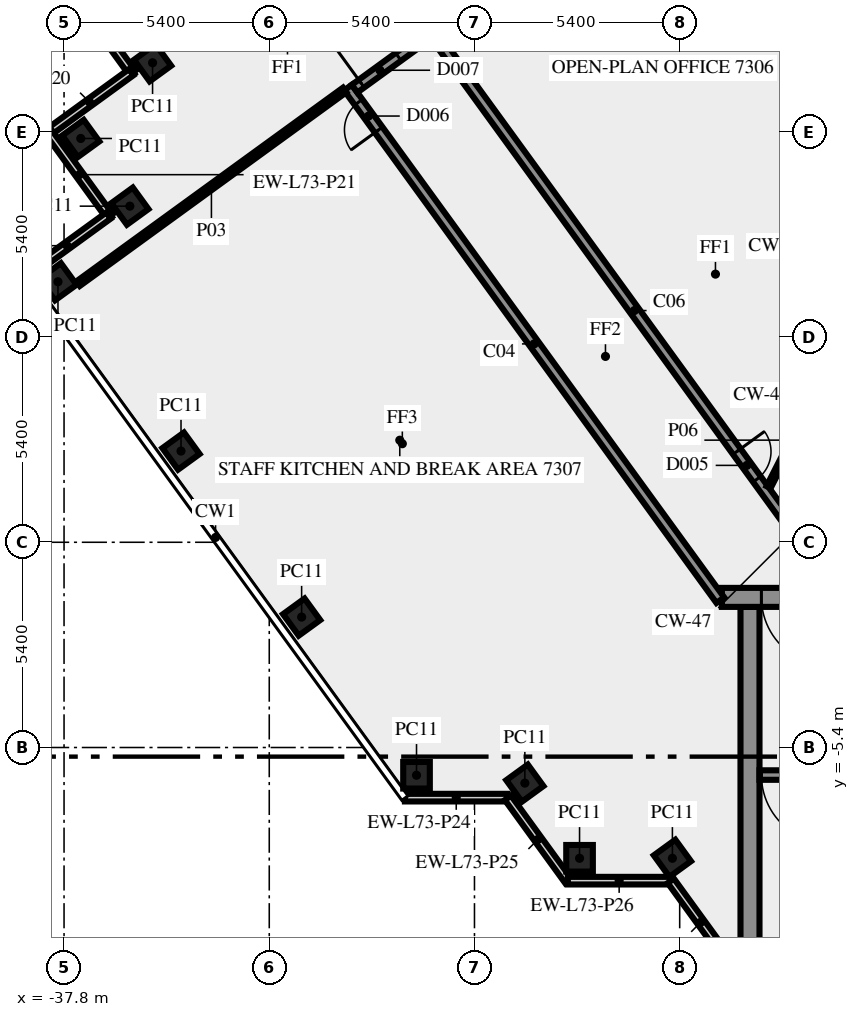
"""IFC4 building model, lengths in metres.
Left out: names, types, materials, properties, quantities, classifications, styles, units other than length and angle.
Written with IfcOpenShell. Run it as: python <this file> out.ifc"""

import sys

from ifc_helpers import new_model, si_unit, direction, frame, frame_2d, origin, origin_2d, place, context, subcontext, project, spatial, rectangle, extrude, element, fill, save


model = new_model("IFC4")
c1 = context("Model", 3, precision=1e-05, world=origin(), true_north=direction((0.0, 1.0)))
c2 = subcontext(c1, "Body", "Model", "MODEL_VIEW")
j1 = project(units=[si_unit("LENGTHUNIT", "METRE"), si_unit("PLANEANGLEUNIT", "RADIAN")], contexts=[c1])
p1 = place(None, origin())
s1 = spatial("IfcSite", under=j1, at=p1, CompositionType="ELEMENT")
p2 = place(p1, origin())
s2 = spatial("IfcBuilding", under=s1, at=p2, CompositionType="ELEMENT")
p3 = place(p2, frame((0.0, 0.0, 315.0)))
s3 = spatial("IfcBuildingStorey", under=s2, at=p3, CompositionType="ELEMENT", Elevation=315.0)
for number, where, z_axis, x_axis in (
    (1, (-35.471, 12.616, 0.0), (0.0, 0.0, 1.0), (-0.809, -0.588, 0.0)),
    (2, (-37.36, 10.625, 0.0), (0.0, 0.0, 1.0), (0.588, -0.809, 0.0)),
    (3, (-36.068, 8.844, 0.0), (0.0, 0.0, 1.0), (0.588, -0.809, 0.0)),
    (4, (-37.96, 6.855, 0.0), (0.0, 0.0, 1.0), (0.588, -0.809, 0.0)),
    (5, (-34.722, 2.4, 0.0), (0.0, 0.0, 1.0), (0.588, -0.809, 0.0)),
    (6, (-31.548, -1.969, 0.0), (0.0, 0.0, 1.0), (0.588, -0.809, 0.0)),
    (7, (-28.525, -6.13, 0.0), (0.0, 0.0, 1.0), (1.0, 0.0, 0.0)),
    (8, (-25.674, -6.337, 0.0), (0.0, 0.0, 1.0), (0.588, -0.809, 0.0)),
    (9, (-24.235, -8.315, 0.0), (0.0, 0.0, 1.0), (1.0, 0.0, 0.0)),
    (10, (-21.792, -8.315, 0.0), (0.0, 0.0, 1.0), (0.588, -0.809, 0.0)),
):
    element("IfcColumn", number, at=place(p3, frame(where, z_axis=z_axis, x_axis=x_axis)), inside=s3, PredefinedType="COLUMN", context=c2, shape_type="SweptSolid", body=[
        extrude(rectangle(XDim=0.7, YDim=0.7, at=origin_2d()), origin(), (0.0, 0.0, 1.0), 3.65),
    ])
for number, where, z_axis, x_axis in (
    (11, (-37.592, 14.536, 0.0), (0.0, 0.0, 1.0), (0.588, -0.809, 0.0)),
    (12, (-36.032, 12.369, 0.0), (0.0, 0.0, 1.0), (-0.809, -0.588, 0.0)),
    (13, (-38.189, 10.765, 0.0), (0.0, 0.0, 1.0), (0.588, -0.809, 0.0)),
    (14, (-36.629, 8.597, 0.0), (0.0, 0.0, 1.0), (-0.809, -0.588, 0.0)),
    (15, (-28.83, -6.719, 0.0), (0.0, 0.0, 1.0), (1.0, 0.0, 0.0)),
):
    element("IfcWall", number, at=place(p3, frame(where, z_axis=z_axis, x_axis=x_axis)), inside=s3, PredefinedType="SOLIDWALL", context=c2, shape_type="SweptSolid", body=[
        extrude(rectangle(XDim=2.7, YDim=0.2, at=frame_2d((1.35, 0.0))), origin(), (0.0, 0.0, 1.0), 3.65),
    ])
p4 = place(p3, frame((-26.12, -6.724, 0.0), z_axis=(0.0, 0.0, 1.0), x_axis=(0.587720002413, -0.809064397168, 0.0)))
e16 = element("IfcWall", 16, at=p4, inside=s3, PredefinedType="SOLIDWALL", context=c2, shape_type="SweptSolid", body=[
    extrude(rectangle(XDim=2.7, YDim=0.2, at=frame_2d((1.35, 0.0))), origin(), (0.0, 0.0, 1.0), 3.65),
])
p5 = place(p3, frame((-24.543, -8.904, 0.0), z_axis=(0.0, 0.0, 1.0), x_axis=(1.0, 0.0, 0.0)))
e17 = element("IfcWall", 17, at=p5, inside=s3, PredefinedType="SOLIDWALL", context=c2, shape_type="SweptSolid", body=[
    extrude(rectangle(XDim=2.7, YDim=0.2, at=frame_2d((1.35, 0.0))), origin(), (0.0, 0.0, 1.0), 3.65),
])
p6 = place(p3, frame((-21.833, -8.909, 0.0), z_axis=(0.0, 0.0, 1.0), x_axis=(0.587766567315, -0.809030569476, 0.0)))
e18 = element("IfcWall", 18, at=p6, inside=s3, PredefinedType="SOLIDWALL", context=c2, shape_type="SweptSolid", body=[
    extrude(rectangle(XDim=2.688, YDim=0.2, at=frame_2d((1.344, 0.0))), origin(), (0.0, 0.0, 1.0), 3.65),
])
p7 = place(p3, frame((-19.75, -10.5, 0.0), z_axis=(0.0, 0.0, 1.0), x_axis=(0.0, 1.0, 0.0)))
e19 = element("IfcWall", 19, at=p7, inside=s3, PredefinedType="SHEAR", context=c2, shape_type="SweptSolid", body=[
    extrude(rectangle(XDim=8.8, YDim=0.5, at=frame_2d((4.4, 0.0))), origin(), (0.0, 0.0, 1.0), 3.65),
])
p8 = place(p3, frame((-11.45, -6.125, 0.0), z_axis=(0.0, 0.0, 1.0), x_axis=(-1.0, 0.0, 0.0)))
e20 = element("IfcWall", 20, at=p8, inside=s3, PredefinedType="SHEAR", context=c2, shape_type="SweptSolid", body=[
    extrude(rectangle(XDim=8.05, YDim=0.25, at=frame_2d((4.025, 0.0))), origin(), (0.0, 0.0, 1.0), 3.65),
])
p9 = place(p8, frame((6.2, 0.0, 0.0)))
e21 = element("IfcOpeningElement", 21, at=p9, cuts=e20, PredefinedType="OPENING", context=c2, shape_type="SweptSolid", body=[
    extrude(rectangle(XDim=1.8, YDim=2.1, at=frame_2d((0.9, 1.05))), frame((0.0, 0.135, 0.0), z_axis=(0.0, -1.0, 0.0), x_axis=(1.0, 0.0, 0.0)), (0.0, 0.0, 1.0), 0.27),
])
p10 = place(p3, frame((20.49, -1.45, 0.0), z_axis=(0.0, 0.0, 1.0), x_axis=(-1.0, 0.0, 0.0)))
e22 = element("IfcWall", 22, at=p10, inside=s3, PredefinedType="SHEAR", context=c2, shape_type="SweptSolid", body=[
    extrude(rectangle(XDim=40.98, YDim=0.5, at=frame_2d((20.49, 0.0))), origin(), (0.0, 0.0, 1.0), 3.65),
])
p11 = place(p10, frame((38.14, 0.0, 0.0)))
e23 = element("IfcOpeningElement", 23, at=p11, cuts=e22, PredefinedType="OPENING", context=c2, shape_type="SweptSolid", body=[
    extrude(rectangle(XDim=1.8, YDim=2.1, at=frame_2d((0.9, 1.05))), frame((0.0, 0.26, 0.0), z_axis=(0.0, -1.0, 0.0), x_axis=(1.0, 0.0, 0.0)), (0.0, 0.0, 1.0), 0.52),
])
p12 = place(p10, frame((35.89, 0.0, 0.0)))
e24 = element("IfcOpeningElement", 24, at=p12, cuts=e22, PredefinedType="OPENING", context=c2, shape_type="SweptSolid", body=[
    extrude(rectangle(XDim=0.9, YDim=2.1, at=frame_2d((0.45, 1.05))), frame((0.0, 0.26, 0.0), z_axis=(0.0, -1.0, 0.0), x_axis=(1.0, 0.0, 0.0)), (0.0, 0.0, 1.0), 0.52),
])
p13 = place(p10, frame((32.94, 0.0, 0.0)))
e25 = element("IfcOpeningElement", 25, at=p13, cuts=e22, PredefinedType="OPENING", context=c2, shape_type="SweptSolid", body=[
    extrude(rectangle(XDim=0.9, YDim=2.1, at=frame_2d((0.45, 1.05))), frame((0.0, 0.26, 0.0), z_axis=(0.0, -1.0, 0.0), x_axis=(1.0, 0.0, 0.0)), (0.0, 0.0, 1.0), 0.52),
])
p14 = place(p10, frame((31.015, 0.0, 0.0)))
e26 = element("IfcOpeningElement", 26, at=p14, cuts=e22, PredefinedType="OPENING", context=c2, shape_type="SweptSolid", body=[
    extrude(rectangle(XDim=0.8, YDim=2.1, at=frame_2d((0.4, 1.05))), frame((0.0, 0.26, 0.0), z_axis=(0.0, -1.0, 0.0), x_axis=(1.0, 0.0, 0.0)), (0.0, 0.0, 1.0), 0.52),
])
p15 = place(p10, frame((24.765, 0.0, 0.0)))
e27 = element("IfcOpeningElement", 27, at=p15, cuts=e22, PredefinedType="OPENING", context=c2, shape_type="SweptSolid", body=[
    extrude(rectangle(XDim=0.8, YDim=2.1, at=frame_2d((0.4, 1.05))), frame((0.0, 0.26, 0.0), z_axis=(0.0, -1.0, 0.0), x_axis=(1.0, 0.0, 0.0)), (0.0, 0.0, 1.0), 0.52),
])
p16 = place(p10, frame((21.765, 0.0, 0.0)))
e28 = element("IfcOpeningElement", 28, at=p16, cuts=e22, PredefinedType="OPENING", context=c2, shape_type="SweptSolid", body=[
    extrude(rectangle(XDim=2.0, YDim=2.1, at=frame_2d((1.0, 1.05))), frame((0.0, 0.26, 0.0), z_axis=(0.0, -1.0, 0.0), x_axis=(1.0, 0.0, 0.0)), (0.0, 0.0, 1.0), 0.52),
])
p17 = place(p10, frame((12.24, 0.0, 0.0)))
e29 = element("IfcOpeningElement", 29, at=p17, cuts=e22, PredefinedType="OPENING", context=c2, shape_type="SweptSolid", body=[
    extrude(rectangle(XDim=0.9, YDim=2.1, at=frame_2d((0.45, 1.05))), frame((0.0, 0.26, 0.0), z_axis=(0.0, -1.0, 0.0), x_axis=(1.0, 0.0, 0.0)), (0.0, 0.0, 1.0), 0.52),
])
p18 = place(p10, frame((7.14, 0.0, 0.0)))
e30 = element("IfcOpeningElement", 30, at=p18, cuts=e22, PredefinedType="OPENING", context=c2, shape_type="SweptSolid", body=[
    extrude(rectangle(XDim=0.9, YDim=2.1, at=frame_2d((0.45, 1.05))), frame((0.0, 0.26, 0.0), z_axis=(0.0, -1.0, 0.0), x_axis=(1.0, 0.0, 0.0)), (0.0, 0.0, 1.0), 0.52),
])
p19 = place(p10, frame((5.028, 0.0, 0.0)))
e31 = element("IfcOpeningElement", 31, at=p19, cuts=e22, PredefinedType="OPENING", context=c2, shape_type="SweptSolid", body=[
    extrude(rectangle(XDim=0.8, YDim=2.1, at=frame_2d((0.4, 1.05))), frame((0.0, 0.26, 0.0), z_axis=(0.0, -1.0, 0.0), x_axis=(1.0, 0.0, 0.0)), (0.0, 0.0, 1.0), 0.52),
])
p20 = place(p10, frame((3.452, 0.0, 0.0)))
e32 = element("IfcOpeningElement", 32, at=p20, cuts=e22, PredefinedType="OPENING", context=c2, shape_type="SweptSolid", body=[
    extrude(rectangle(XDim=0.8, YDim=2.1, at=frame_2d((0.4, 1.05))), frame((0.0, 0.26, 0.0), z_axis=(0.0, -1.0, 0.0), x_axis=(1.0, 0.0, 0.0)), (0.0, 0.0, 1.0), 0.52),
])
p21 = place(p10, frame((1.04, 0.0, 0.0)))
e33 = element("IfcOpeningElement", 33, at=p21, cuts=e22, PredefinedType="OPENING", context=c2, shape_type="SweptSolid", body=[
    extrude(rectangle(XDim=1.8, YDim=2.1, at=frame_2d((0.9, 1.05))), frame((0.0, 0.26, 0.0), z_axis=(0.0, -1.0, 0.0), x_axis=(1.0, 0.0, 0.0)), (0.0, 0.0, 1.0), 0.52),
])
p22 = place(p3, frame((-20.531, -1.523, 0.0), z_axis=(0.0, 0.0, 1.0), x_axis=(-0.587785867777, 0.809016547199, 0.0)))
e34 = element("IfcWall", 34, at=p22, inside=s3, PredefinedType="SOLIDWALL", context=c2, shape_type="SweptSolid", body=[
    extrude(rectangle(XDim=16.67, YDim=0.25, at=frame_2d((8.335, 0.0))), origin(), (0.0, 0.0, 1.0), 3.65),
])
p23 = place(p22, frame((15.296, 0.0, 0.0)))
e35 = element("IfcOpeningElement", 35, at=p23, cuts=e34, PredefinedType="OPENING", context=c2, shape_type="SweptSolid", body=[
    extrude(rectangle(XDim=0.9, YDim=2.1, at=frame_2d((0.45, 1.05))), frame((0.0, 0.135, 0.0), z_axis=(0.0, -1.0, 0.0), x_axis=(1.0, 0.0, 0.0)), (0.0, 0.0, 1.0), 0.27),
])
p24 = place(p3, frame((-30.155, 11.936, 0.0), z_axis=(0.0, 0.0, 1.0), x_axis=(0.809038743598, 0.587755315891, 0.0)))
e36 = element("IfcWall", 36, at=p24, inside=s3, PredefinedType="SOLIDWALL", context=c2, shape_type="SweptSolid", body=[
    extrude(rectangle(XDim=2.65, YDim=0.25, at=frame_2d((1.325, 0.0))), origin(), (0.0, 0.0, 1.0), 3.65),
])
p25 = place(p24, frame((0.225, 0.0, 0.0)))
e37 = element("IfcOpeningElement", 37, at=p25, cuts=e36, PredefinedType="OPENING", context=c2, shape_type="SweptSolid", body=[
    extrude(rectangle(XDim=1.2, YDim=2.1, at=frame_2d((0.6, 1.05))), frame((0.0, 0.135, 0.0), z_axis=(0.0, -1.0, 0.0), x_axis=(1.0, 0.0, 0.0)), (0.0, 0.0, 1.0), 0.27),
])
p26 = place(p3, frame((-28.039, 13.319, 0.0), z_axis=(0.0, 0.0, 1.0), x_axis=(0.587791911753, -0.809012155952, 0.0)))
e38 = element("IfcWall", 38, at=p26, inside=s3, PredefinedType="SOLIDWALL", context=c2, shape_type="SweptSolid", body=[
    extrude(rectangle(XDim=17.853, YDim=0.25, at=frame_2d((8.927, 0.0))), origin(), (0.0, 0.0, 1.0), 3.65),
])
p27 = place(p26, frame((13.512, 0.0, 0.0)))
e39 = element("IfcOpeningElement", 39, at=p27, cuts=e38, PredefinedType="OPENING", context=c2, shape_type="SweptSolid", body=[
    extrude(rectangle(XDim=0.9, YDim=2.1, at=frame_2d((0.45, 1.05))), frame((0.0, 0.135, 0.0), z_axis=(0.0, -1.0, 0.0), x_axis=(1.0, 0.0, 0.0)), (0.0, 0.0, 1.0), 0.27),
])
p28 = place(p3, frame((-37.429, 6.805, 0.0), z_axis=(0.0, 0.0, 1.0), x_axis=(0.809020922653, 0.587779845444, 0.0)))
e40 = element("IfcWall", 40, at=p28, inside=s3, PredefinedType="PARTITIONING", context=c2, shape_type="SweptSolid", body=[
    extrude(rectangle(XDim=8.67, YDim=0.15, at=frame_2d((4.335, 0.0))), origin(), (0.0, 0.0, 1.0), 3.65),
])
p29 = place(p3, frame((-19.261, 1.45, 0.0), z_axis=(0.0, 0.0, 1.0), x_axis=(0.453950796792, 0.891026752736, 0.0)))
e41 = element("IfcWall", 41, at=p29, inside=s3, PredefinedType="PARTITIONING", context=c2, shape_type="SweptSolid", body=[
    extrude(rectangle(XDim=2.778, YDim=0.12, at=frame_2d((1.389, 0.0))), origin(), (0.0, 0.0, 1.0), 3.65),
])
p30 = place(p9, origin())
e42 = element("IfcDoor", 42, at=p30, inside=s3, OperationType="DOUBLE_DOOR_SINGLE_SWING", PredefinedType="DOOR", context=c2, shape_type="SweptSolid", body=[
    extrude(rectangle(XDim=1.8, YDim=2.1, at=frame_2d((0.9, 1.05))), frame((0.0, 0.025, 0.0), z_axis=(0.0, -1.0, 0.0), x_axis=(1.0, 0.0, 0.0)), (0.0, 0.0, 1.0), 0.05),
])
fill(e21, e42)
p31 = place(p11, origin())
e43 = element("IfcDoor", 43, at=p31, inside=s3, OperationType="DOUBLE_DOOR_SINGLE_SWING", PredefinedType="DOOR", context=c2, shape_type="SweptSolid", body=[
    extrude(rectangle(XDim=1.8, YDim=2.1, at=frame_2d((0.9, 1.05))), frame((0.0, 0.025, 0.0), z_axis=(0.0, -1.0, 0.0), x_axis=(1.0, 0.0, 0.0)), (0.0, 0.0, 1.0), 0.05),
])
fill(e23, e43)
p32 = place(p27, origin())
e44 = element("IfcDoor", 44, at=p32, inside=s3, OperationType="SINGLE_SWING_RIGHT", PredefinedType="DOOR", context=c2, shape_type="SweptSolid", body=[
    extrude(rectangle(XDim=0.9, YDim=2.1, at=frame_2d((0.45, 1.05))), frame((0.0, 0.025, 0.0), z_axis=(0.0, -1.0, 0.0), x_axis=(1.0, 0.0, 0.0)), (0.0, 0.0, 1.0), 0.05),
])
fill(e39, e44)
p33 = place(p25, origin())
e45 = element("IfcDoor", 45, at=p33, inside=s3, OperationType="SINGLE_SWING_LEFT", PredefinedType="DOOR", context=c2, shape_type="SweptSolid", body=[
    extrude(rectangle(XDim=1.2, YDim=2.1, at=frame_2d((0.6, 1.05))), frame((0.0, 0.025, 0.0), z_axis=(0.0, -1.0, 0.0), x_axis=(1.0, 0.0, 0.0)), (0.0, 0.0, 1.0), 0.05),
])
fill(e37, e45)
p34 = place(p23, origin())
e46 = element("IfcDoor", 46, at=p34, inside=s3, OperationType="SINGLE_SWING_RIGHT", PredefinedType="DOOR", context=c2, shape_type="SweptSolid", body=[
    extrude(rectangle(XDim=0.9, YDim=2.1, at=frame_2d((0.45, 1.05))), frame((0.0, 0.025, 0.0), z_axis=(0.0, -1.0, 0.0), x_axis=(1.0, 0.0, 0.0)), (0.0, 0.0, 1.0), 0.05),
])
fill(e35, e46)
save(model, sys.argv[1])
